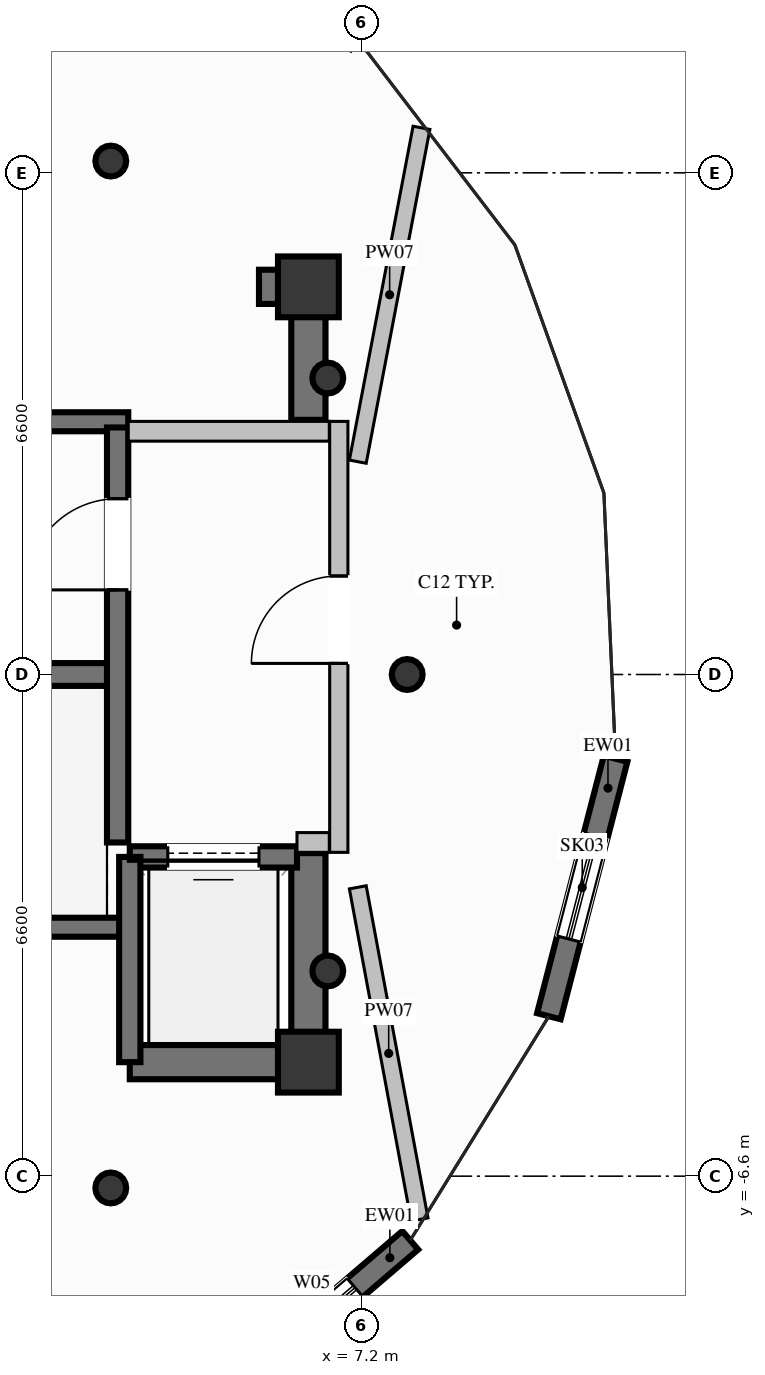
"""IFC4 building model, lengths in metres.
Left out: names, types, materials, properties, quantities, classifications, styles, units other than length and angle.
Written with IfcOpenShell. Run it as: python <this file> out.ifc"""

import sys

from ifc_helpers import new_model, si_unit, direction, frame, frame_2d, origin, origin_2d, place, context, subcontext, project, spatial, rectangle, hollow_circle, extrude, element, fill, save


model = new_model("IFC4")
c1 = context("Model", 3, precision=1e-05, world=origin(), true_north=direction((0.0, 1.0)))
c2 = subcontext(c1, "Body", "Model", "MODEL_VIEW")
j1 = project(units=[si_unit("LENGTHUNIT", "METRE"), si_unit("PLANEANGLEUNIT", "RADIAN")], contexts=[c1])
p1 = place(None, origin())
s1 = spatial("IfcSite", under=j1, at=p1, CompositionType="ELEMENT")
p2 = place(p1, origin())
s2 = spatial("IfcBuilding", under=s1, at=p2, CompositionType="ELEMENT")
p3 = place(p2, frame((0.0, 0.0, 321.0)))
s3 = spatial("IfcBuildingStorey", under=s2, at=p3, CompositionType="ELEMENT", Elevation=321.0)
for number, where, z_axis, x_axis in (
    (1, (6.5, -5.1, 0.0), (0.0, 0.0, 1.0), (1.0, 0.0, 0.0)),
    (2, (6.5, 5.1, 0.0), (0.0, 0.0, 1.0), (1.0, 0.0, 0.0)),
):
    element("IfcColumn", number, at=place(p3, frame(where, z_axis=z_axis, x_axis=x_axis)), inside=s3, PredefinedType="COLUMN", context=c2, shape_type="SweptSolid", body=[
        extrude(rectangle(XDim=0.8, YDim=0.8, at=origin_2d()), origin(), (0.0, 0.0, 1.0), 6.4),
    ])
p4 = place(p3, frame((-3.99, 0.0, 0.0), z_axis=(0.0, 0.0, 1.0), x_axis=(1.0, 0.0, 0.0)))
e3 = element("IfcWall", 3, at=p4, inside=s3, PredefinedType="SHEAR", context=c2, shape_type="SweptSolid", body=[
    extrude(rectangle(XDim=7.98, YDim=0.3, at=frame_2d((3.99, 0.0))), origin(), (0.0, 0.0, 1.0), 6.4),
])
for number, where, z_axis, x_axis in (
    (4, (-4.13, -3.325, 0.0), (0.0, 0.0, 1.0), (1.0, 0.0, 0.0)),
    (5, (-4.13, 3.325, 0.0), (0.0, 0.0, 1.0), (1.0, 0.0, 0.0)),
):
    element("IfcWall", number, at=place(p3, frame(where, z_axis=z_axis, x_axis=x_axis)), inside=s3, PredefinedType="SOLIDWALL", context=c2, shape_type="SweptSolid", body=[
        extrude(rectangle(XDim=8.26, YDim=0.25, at=frame_2d((4.13, 0.0))), origin(), (0.0, 0.0, 1.0), 6.4),
    ])
p5 = place(p3, frame((4.15, -5.1, 0.0), z_axis=(0.0, 0.0, 1.0), x_axis=(1.0, 0.0, 0.0)))
e6 = element("IfcWall", 6, at=p5, inside=s3, PredefinedType="SHEAR", context=c2, shape_type="SweptSolid", body=[
    extrude(rectangle(XDim=2.125, YDim=0.45, at=frame_2d((1.062, 0.0))), origin(), (0.0, 0.0, 1.0), 6.4),
])
p6 = place(p3, frame((5.85, 5.1, 0.0), z_axis=(0.0, 0.0, 1.0), x_axis=(1.0, 0.0, 0.0)))
e7 = element("IfcWall", 7, at=p6, inside=s3, PredefinedType="SHEAR", context=c2, shape_type="SweptSolid", body=[
    extrude(rectangle(XDim=0.425, YDim=0.45, at=frame_2d((0.212, 0.0))), origin(), (0.0, 0.0, 1.0), 6.4),
])
p7 = place(p3, frame((6.5, -5.325, 0.0), z_axis=(0.0, 0.0, 1.0), x_axis=(0.0, 1.0, 0.0)))
e8 = element("IfcWall", 8, at=p7, inside=s3, PredefinedType="SHEAR", context=c2, shape_type="SweptSolid", body=[
    extrude(rectangle(XDim=2.975, YDim=0.45, at=frame_2d((1.487, 0.0))), origin(), (0.0, 0.0, 1.0), 6.4),
])
p8 = place(p3, frame((6.5, 3.35, 0.0), z_axis=(0.0, 0.0, 1.0), x_axis=(0.0, 1.0, 0.0)))
e9 = element("IfcWall", 9, at=p8, inside=s3, PredefinedType="SHEAR", context=c2, shape_type="SweptSolid", body=[
    extrude(rectangle(XDim=1.975, YDim=0.45, at=frame_2d((0.987, 0.0))), origin(), (0.0, 0.0, 1.0), 6.4),
])
for number, where, z_axis, x_axis in (
    (10, (7.8, 0.0, 0.0), (0.0, 0.0, 1.0), (1.0, 0.0, 0.0)),
    (11, (6.755, 3.9, 0.0), (0.0, 0.0, 1.0), (1.0, 0.0, 0.0)),
    (12, (3.9, 6.755, 0.0), (0.0, 0.0, 1.0), (1.0, 0.0, 0.0)),
    (13, (3.9, -6.755, 0.0), (0.0, 0.0, 1.0), (1.0, 0.0, 0.0)),
    (14, (6.755, -3.9, 0.0), (0.0, 0.0, 1.0), (1.0, 0.0, 0.0)),
):
    element("IfcColumn", number, at=place(p3, frame(where, z_axis=z_axis, x_axis=x_axis)), inside=s3, PredefinedType="COLUMN", context=c2, shape_type="SweptSolid", body=[
        extrude(hollow_circle(Radius=0.203, WallThickness=0.016, at=origin_2d()), origin(), (0.0, 0.0, 1.0), 6.4),
    ])
p9 = place(p3, frame((7.84, -7.444, 0.0), z_axis=(0.0, 0.0, 1.0), x_axis=(-0.759534379257, -0.650467160376, 0.0)))
e15 = element("IfcWall", 15, at=p9, inside=s3, PredefinedType="SOLIDWALL", context=c2, shape_type="SweptSolid", body=[
    extrude(rectangle(XDim=3.411, YDim=0.32, at=frame_2d((1.706, 0.0))), origin(), (0.0, 0.0, 1.0), 6.12),
])
p10 = place(p9, frame((0.956, 0.0, 1.1)))
e16 = element("IfcOpeningElement", 16, at=p10, cuts=e15, PredefinedType="OPENING", context=c2, shape_type="SweptSolid", body=[
    extrude(rectangle(XDim=1.5, YDim=1.2, at=frame_2d((0.75, 0.6))), frame((0.0, 0.17, 0.0), z_axis=(0.0, -1.0, 0.0), x_axis=(1.0, 0.0, 0.0)), (0.0, 0.0, 1.0), 0.34),
])
p11 = place(p3, frame((10.542, -1.108, 0.0), z_axis=(0.0, 0.0, 1.0), x_axis=(-0.250831437046, -0.968030779567, 0.0)))
e17 = element("IfcWall", 17, at=p11, inside=s3, PredefinedType="SOLIDWALL", context=c2, shape_type="SweptSolid", body=[
    extrude(rectangle(XDim=3.5, YDim=0.32, at=frame_2d((1.75, 0.0))), origin(), (0.0, 0.0, 1.0), 6.12),
])
p12 = place(p11, frame((1.05, 0.0, 0.6)))
e18 = element("IfcOpeningElement", 18, at=p12, cuts=e17, PredefinedType="OPENING", context=c2, shape_type="SweptSolid", body=[
    extrude(rectangle(XDim=1.4, YDim=1.8, at=frame_2d((0.7, 0.9))), frame((0.0, 0.17, 0.0), z_axis=(0.0, -1.0, 0.0), x_axis=(1.0, 0.0, 0.0)), (0.0, 0.0, 1.0), 0.34),
])
p13 = place(p3, frame((6.35, -2.4, 0.0), z_axis=(0.0, 0.0, 1.0), x_axis=(-1.0, 0.0, 0.0)))
e19 = element("IfcWall", 19, at=p13, inside=s3, PredefinedType="SOLIDWALL", context=c2, shape_type="SweptSolid", body=[
    extrude(rectangle(XDim=2.2, YDim=0.28, at=frame_2d((1.1, 0.0))), origin(), (0.0, 0.0, 1.0), 6.12),
])
p14 = place(p13, frame((0.5, 0.0, 0.0)))
e20 = element("IfcOpeningElement", 20, at=p14, cuts=e19, PredefinedType="OPENING", context=c2, shape_type="SweptSolid", body=[
    extrude(rectangle(XDim=1.2, YDim=2.2, at=frame_2d((0.6, 1.1))), frame((0.0, 0.15, 0.0), z_axis=(0.0, -1.0, 0.0), x_axis=(1.0, 0.0, 0.0)), (0.0, 0.0, 1.0), 0.3),
])
p15 = place(p3, frame((4.15, -2.4, 0.0), z_axis=(0.0, 0.0, 1.0), x_axis=(0.0, -1.0, 0.0)))
e21 = element("IfcWall", 21, at=p15, inside=s3, PredefinedType="SOLIDWALL", context=c2, shape_type="SweptSolid", body=[
    extrude(rectangle(XDim=2.7, YDim=0.28, at=frame_2d((1.35, 0.0))), origin(), (0.0, 0.0, 1.0), 6.12),
])
p16 = place(p3, frame((3.99, -2.21, 0.0), z_axis=(0.0, 0.0, 1.0), x_axis=(0.0, 1.0, 0.0)))
e22 = element("IfcWall", 22, at=p16, inside=s3, PredefinedType="SOLIDWALL", context=c2, shape_type="SweptSolid", body=[
    extrude(rectangle(XDim=5.46, YDim=0.28, at=frame_2d((2.73, 0.0))), origin(), (0.0, 0.0, 1.0), 6.12),
])
p17 = place(p16, frame((3.323, 0.0, 0.0)))
e23 = element("IfcOpeningElement", 23, at=p17, cuts=e22, PredefinedType="OPENING", context=c2, shape_type="SweptSolid", body=[
    extrude(rectangle(XDim=1.2, YDim=2.2, at=frame_2d((0.6, 1.1))), frame((0.0, 0.15, 0.0), z_axis=(0.0, -1.0, 0.0), x_axis=(1.0, 0.0, 0.0)), (0.0, 0.0, 1.0), 0.3),
])
p18 = place(p3, frame((6.9, -2.34, 0.0), z_axis=(0.0, 0.0, 1.0), x_axis=(0.0, 1.0, 0.0)))
e24 = element("IfcWall", 24, at=p18, inside=s3, PredefinedType="PARTITIONING", context=c2, shape_type="SweptSolid", body=[
    extrude(rectangle(XDim=5.67, YDim=0.24, at=frame_2d((2.835, 0.0))), origin(), (0.0, 0.0, 1.0), 5.005),
])
p19 = place(p18, frame((2.486, 0.0, 0.0)))
e25 = element("IfcOpeningElement", 25, at=p19, cuts=e24, PredefinedType="OPENING", context=c2, shape_type="SweptSolid", body=[
    extrude(rectangle(XDim=1.15, YDim=2.2, at=frame_2d((0.575, 1.1))), frame((0.0, 0.13, 0.0), z_axis=(0.0, -1.0, 0.0), x_axis=(1.0, 0.0, 0.0)), (0.0, 0.0, 1.0), 0.26),
])
p20 = place(p3, frame((6.35, -2.21, 0.0), z_axis=(0.0, 0.0, 1.0), x_axis=(1.0, 0.0, 0.0)))
e26 = element("IfcWall", 26, at=p20, inside=s3, PredefinedType="PARTITIONING", context=c2, shape_type="SweptSolid", body=[
    extrude(rectangle(XDim=0.425, YDim=0.26, at=frame_2d((0.212, 0.0))), origin(), (0.0, 0.0, 1.0), 6.12),
])
p21 = place(p3, frame((4.13, 3.2, 0.0), z_axis=(0.0, 0.0, 1.0), x_axis=(1.0, 0.0, 0.0)))
e27 = element("IfcWall", 27, at=p21, inside=s3, PredefinedType="PARTITIONING", context=c2, shape_type="SweptSolid", body=[
    extrude(rectangle(XDim=2.645, YDim=0.26, at=frame_2d((1.323, 0.0))), origin(), (0.0, 0.0, 1.0), 6.12),
])
p22 = place(p3, frame((7.15, 2.8, 0.0), z_axis=(0.0, 0.0, 1.0), x_axis=(0.187455851304, 0.982273029158, 0.0)))
e28 = element("IfcWall", 28, at=p22, inside=s3, PredefinedType="PARTITIONING", context=c2, shape_type="SweptSolid", body=[
    extrude(rectangle(XDim=4.471, YDim=0.225, at=frame_2d((2.236, 0.0))), origin(), (0.0, 0.0, 1.0), 5.005),
])
p23 = place(p3, frame((7.15, -2.8, 0.0), z_axis=(0.0, 0.0, 1.0), x_axis=(0.182905446928, -0.983130508877, 0.0)))
e29 = element("IfcWall", 29, at=p23, inside=s3, PredefinedType="PARTITIONING", context=c2, shape_type="SweptSolid", body=[
    extrude(rectangle(XDim=4.445, YDim=0.225, at=frame_2d((2.222, 0.0))), origin(), (0.0, 0.0, 1.0), 5.005),
])
p24 = place(p10, origin())
e30 = element("IfcWindow", 30, at=p24, inside=s3, PartitioningType="SINGLE_PANEL", PredefinedType="WINDOW", context=c2, shape_type="SweptSolid", body=[
    extrude(rectangle(XDim=1.5, YDim=1.2, at=frame_2d((0.75, 0.6))), frame((0.0, 0.03, 0.0), z_axis=(0.0, -1.0, 0.0), x_axis=(1.0, 0.0, 0.0)), (0.0, 0.0, 1.0), 0.06),
])
fill(e16, e30)
p25 = place(p12, origin())
e31 = element("IfcWindow", 31, at=p25, inside=s3, PartitioningType="SINGLE_PANEL", PredefinedType="SKYLIGHT", context=c2, shape_type="SweptSolid", body=[
    extrude(rectangle(XDim=1.4, YDim=1.8, at=frame_2d((0.7, 0.9))), frame((0.0, 0.03, 0.0), z_axis=(0.0, -1.0, 0.0), x_axis=(1.0, 0.0, 0.0)), (0.0, 0.0, 1.0), 0.06),
])
fill(e18, e31)
p26 = place(p14, origin())
e32 = element("IfcDoor", 32, at=p26, inside=s3, OperationType="SLIDING_TO_LEFT", PredefinedType="DOOR", context=c2, shape_type="SweptSolid", body=[
    extrude(rectangle(XDim=1.2, YDim=2.2, at=frame_2d((0.6, 1.1))), frame((0.0, 0.025, 0.0), z_axis=(0.0, -1.0, 0.0), x_axis=(1.0, 0.0, 0.0)), (0.0, 0.0, 1.0), 0.05),
])
fill(e20, e32)
p27 = place(p17, origin())
e33 = element("IfcDoor", 33, at=p27, inside=s3, OperationType="SINGLE_SWING_LEFT", PredefinedType="DOOR", context=c2, shape_type="SweptSolid", body=[
    extrude(rectangle(XDim=1.2, YDim=2.2, at=frame_2d((0.6, 1.1))), frame((0.0, 0.025, 0.0), z_axis=(0.0, -1.0, 0.0), x_axis=(1.0, 0.0, 0.0)), (0.0, 0.0, 1.0), 0.05),
])
fill(e23, e33)
p28 = place(p19, origin())
e34 = element("IfcDoor", 34, at=p28, inside=s3, OperationType="SINGLE_SWING_LEFT", PredefinedType="DOOR", context=c2, shape_type="SweptSolid", body=[
    extrude(rectangle(XDim=1.15, YDim=2.2, at=frame_2d((0.575, 1.1))), frame((0.0, 0.025, 0.0), z_axis=(0.0, -1.0, 0.0), x_axis=(1.0, 0.0, 0.0)), (0.0, 0.0, 1.0), 0.05),
])
fill(e25, e34)
save(model, sys.argv[1])
